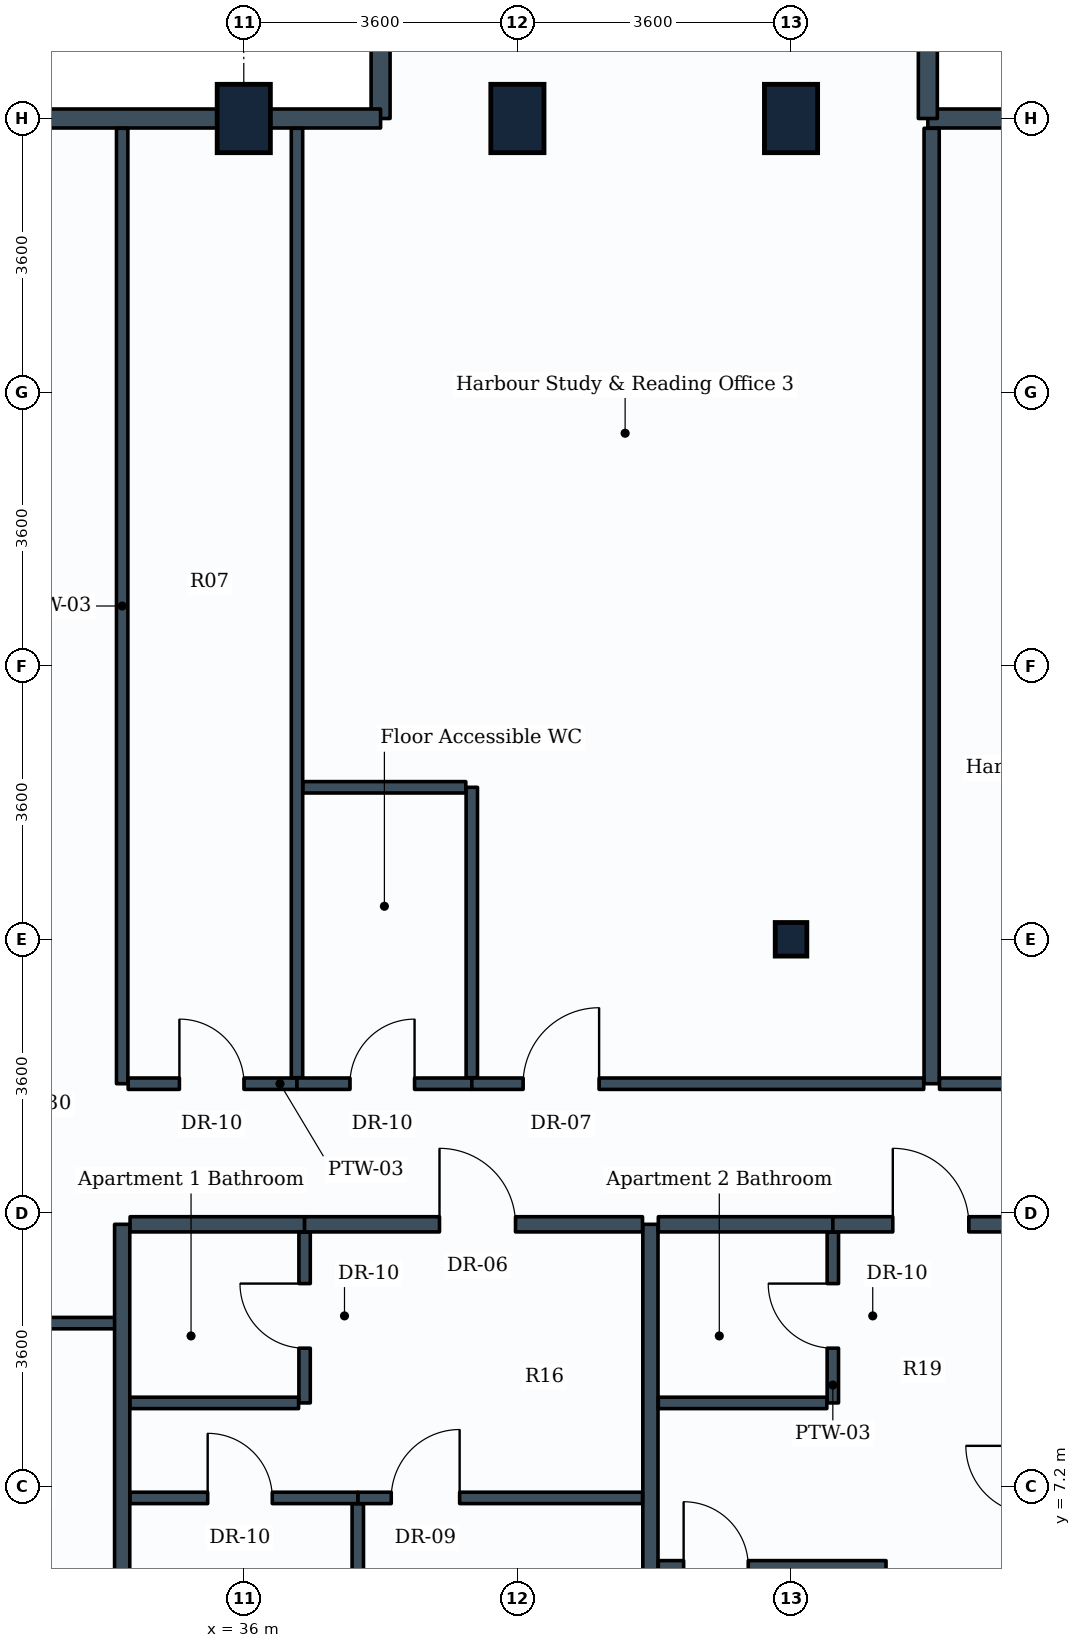
"""IFC4 building model, lengths in metres.
Left out: names, types, materials, properties, quantities, classifications, styles, units other than length and angle.
Written with IfcOpenShell. Run it as: python <this file> out.ifc"""

import sys

from ifc_helpers import new_model, si_unit, direction, frame, frame_2d, origin, origin_2d, place, context, subcontext, project, spatial, rectangle, i_section, extrude, element, fill, save


model = new_model("IFC4")
c1 = context("Model", 3, precision=1e-05, world=origin(), true_north=direction((0.0, 1.0)))
c2 = subcontext(c1, "Body", "Model", "MODEL_VIEW")
j1 = project(units=[si_unit("LENGTHUNIT", "METRE"), si_unit("PLANEANGLEUNIT", "RADIAN")], contexts=[c1])
p1 = place(None, origin())
s1 = spatial("IfcSite", under=j1, at=p1, CompositionType="ELEMENT")
p2 = place(p1, origin())
s2 = spatial("IfcBuilding", under=s1, at=p2, CompositionType="ELEMENT")
p3 = place(p2, frame((0.0, 0.0, 186.2)))
s3 = spatial("IfcBuildingStorey", under=s2, at=p3, CompositionType="ELEMENT", Elevation=186.2)
for number, where, z_axis, x_axis in (
    (1, (36.0, 25.2, 0.0), (0.0, 0.0, 1.0), (1.0, 0.0, 0.0)),
    (2, (39.6, 25.2, 0.0), (0.0, 0.0, 1.0), (1.0, 0.0, 0.0)),
):
    element("IfcColumn", number, at=place(p3, frame(where, z_axis=z_axis, x_axis=x_axis)), inside=s3, PredefinedType="COLUMN", context=c2, shape_type="SweptSolid", body=[
        extrude(rectangle(XDim=0.7, YDim=0.9, at=origin_2d()), origin(), (0.0, 0.0, 1.0), 3.8),
    ])
p4 = place(p3, frame((43.2, 14.4, 0.0), z_axis=(0.0, 0.0, 1.0), x_axis=(1.0, 0.0, 0.0)))
e3 = element("IfcColumn", 3, at=p4, inside=s3, PredefinedType="COLUMN", context=c2, shape_type="SweptSolid", body=[
    extrude(i_section(OverallWidth=0.416, OverallDepth=0.442, WebThickness=0.025, FlangeThickness=0.041, FilletRadius=0.015, at=origin_2d()), origin(), (0.0, 0.0, 1.0), 3.8),
])
p5 = place(p3, frame((43.2, 25.2, 0.0), z_axis=(0.0, 0.0, 1.0), x_axis=(1.0, 0.0, 0.0)))
e4 = element("IfcColumn", 4, at=p5, inside=s3, PredefinedType="COLUMN", context=c2, shape_type="SweptSolid", body=[
    extrude(rectangle(XDim=0.7, YDim=0.9, at=origin_2d()), origin(), (0.0, 0.0, 1.0), 3.8),
])
p6 = place(p3, frame((45.0, 25.2, 0.0), z_axis=(0.0, 0.0, 1.0), x_axis=(1.0, 0.0, 0.0)))
e5 = element("IfcWall", 5, at=p6, inside=s3, PredefinedType="STANDARD", context=c2, shape_type="SweptSolid", body=[
    extrude(rectangle(XDim=1.8, YDim=0.25, at=frame_2d((0.9, 0.0))), origin(), (0.0, 0.0, 1.0), 2.93),
])
for number, where, z_axis, x_axis in (
    (6, (45.0, 27.3, 0.0), (0.0, 0.0, 1.0), (0.0, -1.0, 0.0)),
    (7, (37.8, 27.3, 0.0), (0.0, 0.0, 1.0), (0.0, -1.0, 0.0)),
):
    element("IfcWall", number, at=place(p3, frame(where, z_axis=z_axis, x_axis=x_axis)), inside=s3, PredefinedType="STANDARD", context=c2, shape_type="SweptSolid", body=[
        extrude(rectangle(XDim=2.1, YDim=0.25, at=frame_2d((1.05, 0.0))), origin(), (0.0, 0.0, 1.0), 2.93),
    ])
p7 = place(p3, frame((36.0, 25.2, 0.0), z_axis=(0.0, 0.0, 1.0), x_axis=(1.0, 0.0, 0.0)))
e8 = element("IfcWall", 8, at=p7, inside=s3, PredefinedType="STANDARD", context=c2, shape_type="SweptSolid", body=[
    extrude(rectangle(XDim=1.8, YDim=0.25, at=frame_2d((0.9, 0.0))), origin(), (0.0, 0.0, 1.0), 2.93),
])
p8 = place(p3, frame((32.4, 25.2, 0.0), z_axis=(0.0, 0.0, 1.0), x_axis=(1.0, 0.0, 0.0)))
e9 = element("IfcWall", 9, at=p8, inside=s3, PredefinedType="STANDARD", context=c2, shape_type="SweptSolid", body=[
    extrude(rectangle(XDim=3.6, YDim=0.25, at=frame_2d((1.8, 0.0))), origin(), (0.0, 0.0, 1.0), 2.93),
])
p9 = place(p3, frame((34.4, 12.5, 0.0), z_axis=(0.0, 0.0, 1.0), x_axis=(0.0, 1.0, 0.0)))
e10 = element("IfcWall", 10, at=p9, inside=s3, PredefinedType="PARTITIONING", context=c2, shape_type="SweptSolid", body=[
    extrude(rectangle(XDim=12.571, YDim=0.15, at=frame_2d((6.286, 0.0))), origin(), (0.0, 0.0, 1.0), 2.93),
])
p10 = place(p3, frame((34.479, 12.5, 0.0), z_axis=(0.0, 0.0, 1.0), x_axis=(1.0, 0.0, 0.0)))
e11 = element("IfcWall", 11, at=p10, inside=s3, PredefinedType="PARTITIONING", context=c2, shape_type="SweptSolid", body=[
    extrude(rectangle(XDim=2.221, YDim=0.15, at=frame_2d((1.11, 0.0))), origin(), (0.0, 0.0, 1.0), 3.22),
])
p11 = place(p10, frame((0.674, 0.0, 0.0)))
e12 = element("IfcOpeningElement", 12, at=p11, cuts=e11, PredefinedType="OPENING", context=c2, shape_type="SweptSolid", body=[
    extrude(rectangle(XDim=0.85, YDim=2.1, at=frame_2d((0.425, 1.05))), frame((0.0, 0.085, 0.0), z_axis=(0.0, -1.0, 0.0), x_axis=(1.0, 0.0, 0.0)), (0.0, 0.0, 1.0), 0.17),
])
p12 = place(p3, frame((36.7, 12.579, 0.0), z_axis=(0.0, 0.0, 1.0), x_axis=(0.0, 1.0, 0.0)))
e13 = element("IfcWall", 13, at=p12, inside=s3, PredefinedType="PARTITIONING", context=c2, shape_type="SweptSolid", body=[
    extrude(rectangle(XDim=12.492, YDim=0.15, at=frame_2d((6.246, 0.0))), origin(), (0.0, 0.0, 1.0), 2.93),
])
p13 = place(p3, frame((36.7, 12.5, 0.0), z_axis=(0.0, 0.0, 1.0), x_axis=(1.0, 0.0, 0.0)))
e14 = element("IfcWall", 14, at=p13, inside=s3, PredefinedType="PARTITIONING", context=c2, shape_type="SweptSolid", body=[
    extrude(rectangle(XDim=2.3, YDim=0.15, at=frame_2d((1.15, 0.0))), origin(), (0.0, 0.0, 1.0), 3.535),
])
p14 = place(p13, frame((0.697, 0.0, 0.0)))
e15 = element("IfcOpeningElement", 15, at=p14, cuts=e14, PredefinedType="OPENING", context=c2, shape_type="SweptSolid", body=[
    extrude(rectangle(XDim=0.85, YDim=2.1, at=frame_2d((0.425, 1.05))), frame((0.0, 0.085, 0.0), z_axis=(0.0, -1.0, 0.0), x_axis=(1.0, 0.0, 0.0)), (0.0, 0.0, 1.0), 0.17),
])
p15 = place(p3, frame((39.0, 12.579, 0.0), z_axis=(0.0, 0.0, 1.0), x_axis=(0.0, 1.0, 0.0)))
e16 = element("IfcWall", 16, at=p15, inside=s3, PredefinedType="PARTITIONING", context=c2, shape_type="SweptSolid", body=[
    extrude(rectangle(XDim=3.821, YDim=0.15, at=frame_2d((1.91, 0.0))), origin(), (0.0, 0.0, 1.0), 3.17),
])
p16 = place(p3, frame((36.779, 16.4, 0.0), z_axis=(0.0, 0.0, 1.0), x_axis=(1.0, 0.0, 0.0)))
e17 = element("IfcWall", 17, at=p16, inside=s3, PredefinedType="PARTITIONING", context=c2, shape_type="SweptSolid", body=[
    extrude(rectangle(XDim=2.142, YDim=0.15, at=frame_2d((1.071, 0.0))), origin(), (0.0, 0.0, 1.0), 3.535),
])
p17 = place(p3, frame((28.879, 9.35, 0.0), z_axis=(0.0, 0.0, 1.0), x_axis=(1.0, 0.0, 0.0)))
e18 = element("IfcWall", 18, at=p17, inside=s3, PredefinedType="PARTITIONING", context=c2, shape_type="SweptSolid", body=[
    extrude(rectangle(XDim=5.521, YDim=0.15, at=frame_2d((2.76, 0.0))), origin(), (0.0, 0.0, 1.0), 3.535),
])
p18 = place(p17, frame((0.36, 0.0, 0.0)))
e19 = element("IfcOpeningElement", 19, at=p18, cuts=e18, PredefinedType="OPENING", context=c2, shape_type="SweptSolid", body=[
    extrude(rectangle(XDim=1.0, YDim=2.1, at=frame_2d((0.5, 1.05))), frame((0.0, 0.085, 0.0), z_axis=(0.0, -1.0, 0.0), x_axis=(1.0, 0.0, 0.0)), (0.0, 0.0, 1.0), 0.17),
])
for number, where, z_axis, x_axis in (
    (20, (34.4, 3.729, 0.0), (0.0, 0.0, 1.0), (0.0, 1.0, 0.0)),
    (21, (41.35, 3.729, 0.0), (0.0, 0.0, 1.0), (0.0, 1.0, 0.0)),
):
    element("IfcWall", number, at=place(p3, frame(where, z_axis=z_axis, x_axis=x_axis)), inside=s3, PredefinedType="PARTITIONING", context=c2, shape_type="SweptSolid", body=[
        extrude(rectangle(XDim=6.921, YDim=0.2, at=frame_2d((3.46, 0.0))), origin(), (0.0, 0.0, 1.0), 2.93),
    ])
p19 = place(p3, frame((34.504, 10.65, 0.0), z_axis=(0.0, 0.0, 1.0), x_axis=(1.0, 0.0, 0.0)))
e22 = element("IfcWall", 22, at=p19, inside=s3, PredefinedType="PARTITIONING", context=c2, shape_type="SweptSolid", body=[
    extrude(rectangle(XDim=2.296, YDim=0.2, at=frame_2d((1.148, 0.0))), origin(), (0.0, 0.0, 1.0), 3.22),
])
p20 = place(p3, frame((36.8, 8.3, 0.0), z_axis=(0.0, 0.0, 1.0), x_axis=(0.0, 1.0, 0.0)))
e23 = element("IfcWall", 23, at=p20, inside=s3, PredefinedType="PARTITIONING", context=c2, shape_type="SweptSolid", body=[
    extrude(rectangle(XDim=2.246, YDim=0.15, at=frame_2d((1.123, 0.0))), origin(), (0.0, 0.0, 1.0), 3.535),
])
p21 = place(p20, frame((0.72, 0.0, 0.0)))
e24 = element("IfcOpeningElement", 24, at=p21, cuts=e23, PredefinedType="OPENING", context=c2, shape_type="SweptSolid", body=[
    extrude(rectangle(XDim=0.85, YDim=2.1, at=frame_2d((0.425, 1.05))), frame((0.0, 0.085, 0.0), z_axis=(0.0, -1.0, 0.0), x_axis=(1.0, 0.0, 0.0)), (0.0, 0.0, 1.0), 0.17),
])
p22 = place(p3, frame((34.504, 8.3, 0.0), z_axis=(0.0, 0.0, 1.0), x_axis=(1.0, 0.0, 0.0)))
e25 = element("IfcWall", 25, at=p22, inside=s3, PredefinedType="PARTITIONING", context=c2, shape_type="SweptSolid", body=[
    extrude(rectangle(XDim=2.217, YDim=0.15, at=frame_2d((1.108, 0.0))), origin(), (0.0, 0.0, 1.0), 3.22),
])
p23 = place(p3, frame((36.8, 10.65, 0.0), z_axis=(0.0, 0.0, 1.0), x_axis=(1.0, 0.0, 0.0)))
e26 = element("IfcWall", 26, at=p23, inside=s3, PredefinedType="PARTITIONING", context=c2, shape_type="SweptSolid", body=[
    extrude(rectangle(XDim=4.446, YDim=0.2, at=frame_2d((2.223, 0.0))), origin(), (0.0, 0.0, 1.0), 3.17),
])
p24 = place(p23, frame((1.775, 0.0, 0.0)))
e27 = element("IfcOpeningElement", 27, at=p24, cuts=e26, PredefinedType="OPENING", context=c2, shape_type="SweptSolid", body=[
    extrude(rectangle(XDim=1.0, YDim=2.1, at=frame_2d((0.5, 1.05))), frame((0.0, 0.11, 0.0), z_axis=(0.0, -1.0, 0.0), x_axis=(1.0, 0.0, 0.0)), (0.0, 0.0, 1.0), 0.22),
])
p25 = place(p3, frame((37.5, 7.05, 0.0), z_axis=(0.0, 0.0, 1.0), x_axis=(1.0, 0.0, 0.0)))
e28 = element("IfcWall", 28, at=p25, inside=s3, PredefinedType="PARTITIONING", context=c2, shape_type="SweptSolid", body=[
    extrude(rectangle(XDim=3.746, YDim=0.15, at=frame_2d((1.873, 0.0))), origin(), (0.0, 0.0, 1.0), 3.17),
])
p26 = place(p25, frame((0.44, 0.0, 0.0)))
e29 = element("IfcOpeningElement", 29, at=p26, cuts=e28, PredefinedType="OPENING", context=c2, shape_type="SweptSolid", body=[
    extrude(rectangle(XDim=0.9, YDim=2.1, at=frame_2d((0.45, 1.05))), frame((0.0, 0.085, 0.0), z_axis=(0.0, -1.0, 0.0), x_axis=(1.0, 0.0, 0.0)), (0.0, 0.0, 1.0), 0.17),
])
p27 = place(p3, frame((34.504, 7.05, 0.0), z_axis=(0.0, 0.0, 1.0), x_axis=(1.0, 0.0, 0.0)))
e30 = element("IfcWall", 30, at=p27, inside=s3, PredefinedType="PARTITIONING", context=c2, shape_type="SweptSolid", body=[
    extrude(rectangle(XDim=2.996, YDim=0.15, at=frame_2d((1.498, 0.0))), origin(), (0.0, 0.0, 1.0), 3.17),
])
p28 = place(p27, frame((1.021, 0.0, 0.0)))
e31 = element("IfcOpeningElement", 31, at=p28, cuts=e30, PredefinedType="OPENING", context=c2, shape_type="SweptSolid", body=[
    extrude(rectangle(XDim=0.85, YDim=2.1, at=frame_2d((0.425, 1.05))), frame((0.0, 0.085, 0.0), z_axis=(0.0, -1.0, 0.0), x_axis=(1.0, 0.0, 0.0)), (0.0, 0.0, 1.0), 0.17),
])
p29 = place(p3, frame((37.5, 3.729, 0.0), z_axis=(0.0, 0.0, 1.0), x_axis=(0.0, 1.0, 0.0)))
e32 = element("IfcWall", 32, at=p29, inside=s3, PredefinedType="PARTITIONING", context=c2, shape_type="SweptSolid", body=[
    extrude(rectangle(XDim=3.242, YDim=0.15, at=frame_2d((1.621, 0.0))), origin(), (0.0, 0.0, 1.0), 2.93),
])
p30 = place(p3, frame((41.454, 10.65, 0.0), z_axis=(0.0, 0.0, 1.0), x_axis=(1.0, 0.0, 0.0)))
e33 = element("IfcWall", 33, at=p30, inside=s3, PredefinedType="PARTITIONING", context=c2, shape_type="SweptSolid", body=[
    extrude(rectangle(XDim=2.296, YDim=0.2, at=frame_2d((1.148, 0.0))), origin(), (0.0, 0.0, 1.0), 3.17),
])
p31 = place(p3, frame((43.75, 8.3, 0.0), z_axis=(0.0, 0.0, 1.0), x_axis=(0.0, 1.0, 0.0)))
e34 = element("IfcWall", 34, at=p31, inside=s3, PredefinedType="PARTITIONING", context=c2, shape_type="SweptSolid", body=[
    extrude(rectangle(XDim=2.246, YDim=0.15, at=frame_2d((1.123, 0.0))), origin(), (0.0, 0.0, 1.0), 3.535),
])
p32 = place(p31, frame((0.72, 0.0, 0.0)))
e35 = element("IfcOpeningElement", 35, at=p32, cuts=e34, PredefinedType="OPENING", context=c2, shape_type="SweptSolid", body=[
    extrude(rectangle(XDim=0.85, YDim=2.1, at=frame_2d((0.425, 1.05))), frame((0.0, 0.085, 0.0), z_axis=(0.0, -1.0, 0.0), x_axis=(1.0, 0.0, 0.0)), (0.0, 0.0, 1.0), 0.17),
])
p33 = place(p3, frame((41.454, 8.3, 0.0), z_axis=(0.0, 0.0, 1.0), x_axis=(1.0, 0.0, 0.0)))
e36 = element("IfcWall", 36, at=p33, inside=s3, PredefinedType="PARTITIONING", context=c2, shape_type="SweptSolid", body=[
    extrude(rectangle(XDim=2.217, YDim=0.15, at=frame_2d((1.108, 0.0))), origin(), (0.0, 0.0, 1.0), 3.18),
])
p34 = place(p3, frame((43.75, 10.65, 0.0), z_axis=(0.0, 0.0, 1.0), x_axis=(1.0, 0.0, 0.0)))
e37 = element("IfcWall", 37, at=p34, inside=s3, PredefinedType="PARTITIONING", context=c2, shape_type="SweptSolid", body=[
    extrude(rectangle(XDim=2.65, YDim=0.2, at=frame_2d((1.325, 0.0))), origin(), (0.0, 0.0, 1.0), 3.535),
])
p35 = place(p34, frame((0.789, 0.0, 0.0)))
e38 = element("IfcOpeningElement", 38, at=p35, cuts=e37, PredefinedType="OPENING", context=c2, shape_type="SweptSolid", body=[
    extrude(rectangle(XDim=1.0, YDim=2.1, at=frame_2d((0.5, 1.05))), frame((0.0, 0.11, 0.0), z_axis=(0.0, -1.0, 0.0), x_axis=(1.0, 0.0, 0.0)), (0.0, 0.0, 1.0), 0.22),
])
p36 = place(p3, frame((41.454, 6.15, 0.0), z_axis=(0.0, 0.0, 1.0), x_axis=(1.0, 0.0, 0.0)))
e39 = element("IfcWall", 39, at=p36, inside=s3, PredefinedType="PARTITIONING", context=c2, shape_type="SweptSolid", body=[
    extrude(rectangle(XDim=2.996, YDim=0.15, at=frame_2d((1.498, 0.0))), origin(), (0.0, 0.0, 1.0), 3.18),
])
p37 = place(p36, frame((0.333, 0.0, 0.0)))
e40 = element("IfcOpeningElement", 40, at=p37, cuts=e39, PredefinedType="OPENING", context=c2, shape_type="SweptSolid", body=[
    extrude(rectangle(XDim=0.85, YDim=2.1, at=frame_2d((0.425, 1.05))), frame((0.0, 0.085, 0.0), z_axis=(0.0, -1.0, 0.0), x_axis=(1.0, 0.0, 0.0)), (0.0, 0.0, 1.0), 0.17),
])
p38 = place(p3, frame((45.05, 12.5, 0.0), z_axis=(0.0, 0.0, 1.0), x_axis=(0.0, 1.0, 0.0)))
e41 = element("IfcWall", 41, at=p38, inside=s3, PredefinedType="PARTITIONING", context=c2, shape_type="SweptSolid", body=[
    extrude(rectangle(XDim=12.571, YDim=0.2, at=frame_2d((6.286, 0.0))), origin(), (0.0, 0.0, 1.0), 2.93),
])
p39 = place(p3, frame((39.0, 12.5, 0.0), z_axis=(0.0, 0.0, 1.0), x_axis=(1.0, 0.0, 0.0)))
e42 = element("IfcWall", 42, at=p39, inside=s3, PredefinedType="PARTITIONING", context=c2, shape_type="SweptSolid", body=[
    extrude(rectangle(XDim=5.946, YDim=0.15, at=frame_2d((2.973, 0.0))), origin(), (0.0, 0.0, 1.0), 3.17),
])
p40 = place(p39, frame((0.675, 0.0, 0.0)))
e43 = element("IfcOpeningElement", 43, at=p40, cuts=e42, PredefinedType="OPENING", context=c2, shape_type="SweptSolid", body=[
    extrude(rectangle(XDim=1.0, YDim=2.1, at=frame_2d((0.5, 1.05))), frame((0.0, 0.085, 0.0), z_axis=(0.0, -1.0, 0.0), x_axis=(1.0, 0.0, 0.0)), (0.0, 0.0, 1.0), 0.17),
])
p41 = place(p3, frame((45.154, 12.5, 0.0), z_axis=(0.0, 0.0, 1.0), x_axis=(1.0, 0.0, 0.0)))
e44 = element("IfcWall", 44, at=p41, inside=s3, PredefinedType="PARTITIONING", context=c2, shape_type="SweptSolid", body=[
    extrude(rectangle(XDim=5.117, YDim=0.15, at=frame_2d((2.559, 0.0))), origin(), (0.0, 0.0, 1.0), 2.93),
])
p42 = place(p41, frame((1.44, 0.0, 0.0)))
e45 = element("IfcOpeningElement", 45, at=p42, cuts=e44, PredefinedType="OPENING", context=c2, shape_type="SweptSolid", body=[
    extrude(rectangle(XDim=1.0, YDim=2.1, at=frame_2d((0.5, 1.05))), frame((0.0, 0.085, 0.0), z_axis=(0.0, -1.0, 0.0), x_axis=(1.0, 0.0, 0.0)), (0.0, 0.0, 1.0), 0.17),
])
p43 = place(p11, origin())
e46 = element("IfcDoor", 46, at=p43, inside=s3, OperationType="SINGLE_SWING_LEFT", PredefinedType="DOOR", context=c2, shape_type="SweptSolid", body=[
    extrude(rectangle(XDim=0.85, YDim=2.1, at=frame_2d((0.425, 1.05))), frame((0.0, 0.025, 0.0), z_axis=(0.0, -1.0, 0.0), x_axis=(1.0, 0.0, 0.0)), (0.0, 0.0, 1.0), 0.05),
])
fill(e12, e46)
p44 = place(p14, origin())
e47 = element("IfcDoor", 47, at=p44, inside=s3, OperationType="SINGLE_SWING_RIGHT", PredefinedType="DOOR", context=c2, shape_type="SweptSolid", body=[
    extrude(rectangle(XDim=0.85, YDim=2.1, at=frame_2d((0.425, 1.05))), frame((0.0, 0.025, 0.0), z_axis=(0.0, -1.0, 0.0), x_axis=(1.0, 0.0, 0.0)), (0.0, 0.0, 1.0), 0.05),
])
fill(e15, e47)
p45 = place(p21, origin())
e48 = element("IfcDoor", 48, at=p45, inside=s3, OperationType="SINGLE_SWING_RIGHT", PredefinedType="DOOR", context=c2, shape_type="SweptSolid", body=[
    extrude(rectangle(XDim=0.85, YDim=2.1, at=frame_2d((0.425, 1.05))), frame((0.0, 0.025, 0.0), z_axis=(0.0, -1.0, 0.0), x_axis=(1.0, 0.0, 0.0)), (0.0, 0.0, 1.0), 0.05),
])
fill(e24, e48)
p46 = place(p24, origin())
e49 = element("IfcDoor", 49, at=p46, inside=s3, OperationType="SINGLE_SWING_LEFT", PredefinedType="DOOR", context=c2, shape_type="SweptSolid", body=[
    extrude(rectangle(XDim=1.0, YDim=2.1, at=frame_2d((0.5, 1.05))), frame((0.0, 0.025, 0.0), z_axis=(0.0, -1.0, 0.0), x_axis=(1.0, 0.0, 0.0)), (0.0, 0.0, 1.0), 0.05),
])
fill(e27, e49)
p47 = place(p26, origin())
e50 = element("IfcDoor", 50, at=p47, inside=s3, OperationType="SINGLE_SWING_RIGHT", PredefinedType="DOOR", context=c2, shape_type="SweptSolid", body=[
    extrude(rectangle(XDim=0.9, YDim=2.1, at=frame_2d((0.45, 1.05))), frame((0.0, 0.025, 0.0), z_axis=(0.0, -1.0, 0.0), x_axis=(1.0, 0.0, 0.0)), (0.0, 0.0, 1.0), 0.05),
])
fill(e29, e50)
p48 = place(p28, origin())
e51 = element("IfcDoor", 51, at=p48, inside=s3, OperationType="SINGLE_SWING_LEFT", PredefinedType="DOOR", context=c2, shape_type="SweptSolid", body=[
    extrude(rectangle(XDim=0.85, YDim=2.1, at=frame_2d((0.425, 1.05))), frame((0.0, 0.025, 0.0), z_axis=(0.0, -1.0, 0.0), x_axis=(1.0, 0.0, 0.0)), (0.0, 0.0, 1.0), 0.05),
])
fill(e31, e51)
p49 = place(p32, origin())
e52 = element("IfcDoor", 52, at=p49, inside=s3, OperationType="SINGLE_SWING_RIGHT", PredefinedType="DOOR", context=c2, shape_type="SweptSolid", body=[
    extrude(rectangle(XDim=0.85, YDim=2.1, at=frame_2d((0.425, 1.05))), frame((0.0, 0.025, 0.0), z_axis=(0.0, -1.0, 0.0), x_axis=(1.0, 0.0, 0.0)), (0.0, 0.0, 1.0), 0.05),
])
fill(e35, e52)
p50 = place(p35, origin())
e53 = element("IfcDoor", 53, at=p50, inside=s3, OperationType="SINGLE_SWING_LEFT", PredefinedType="DOOR", context=c2, shape_type="SweptSolid", body=[
    extrude(rectangle(XDim=1.0, YDim=2.1, at=frame_2d((0.5, 1.05))), frame((0.0, 0.025, 0.0), z_axis=(0.0, -1.0, 0.0), x_axis=(1.0, 0.0, 0.0)), (0.0, 0.0, 1.0), 0.05),
])
fill(e38, e53)
p51 = place(p37, origin())
e54 = element("IfcDoor", 54, at=p51, inside=s3, OperationType="SINGLE_SWING_LEFT", PredefinedType="DOOR", context=c2, shape_type="SweptSolid", body=[
    extrude(rectangle(XDim=0.85, YDim=2.1, at=frame_2d((0.425, 1.05))), frame((0.0, 0.025, 0.0), z_axis=(0.0, -1.0, 0.0), x_axis=(1.0, 0.0, 0.0)), (0.0, 0.0, 1.0), 0.05),
])
fill(e40, e54)
p52 = place(p40, origin())
e55 = element("IfcDoor", 55, at=p52, inside=s3, OperationType="SINGLE_SWING_RIGHT", PredefinedType="DOOR", context=c2, shape_type="SweptSolid", body=[
    extrude(rectangle(XDim=1.0, YDim=2.1, at=frame_2d((0.5, 1.05))), frame((0.0, 0.025, 0.0), z_axis=(0.0, -1.0, 0.0), x_axis=(1.0, 0.0, 0.0)), (0.0, 0.0, 1.0), 0.05),
])
fill(e43, e55)
save(model, sys.argv[1])
